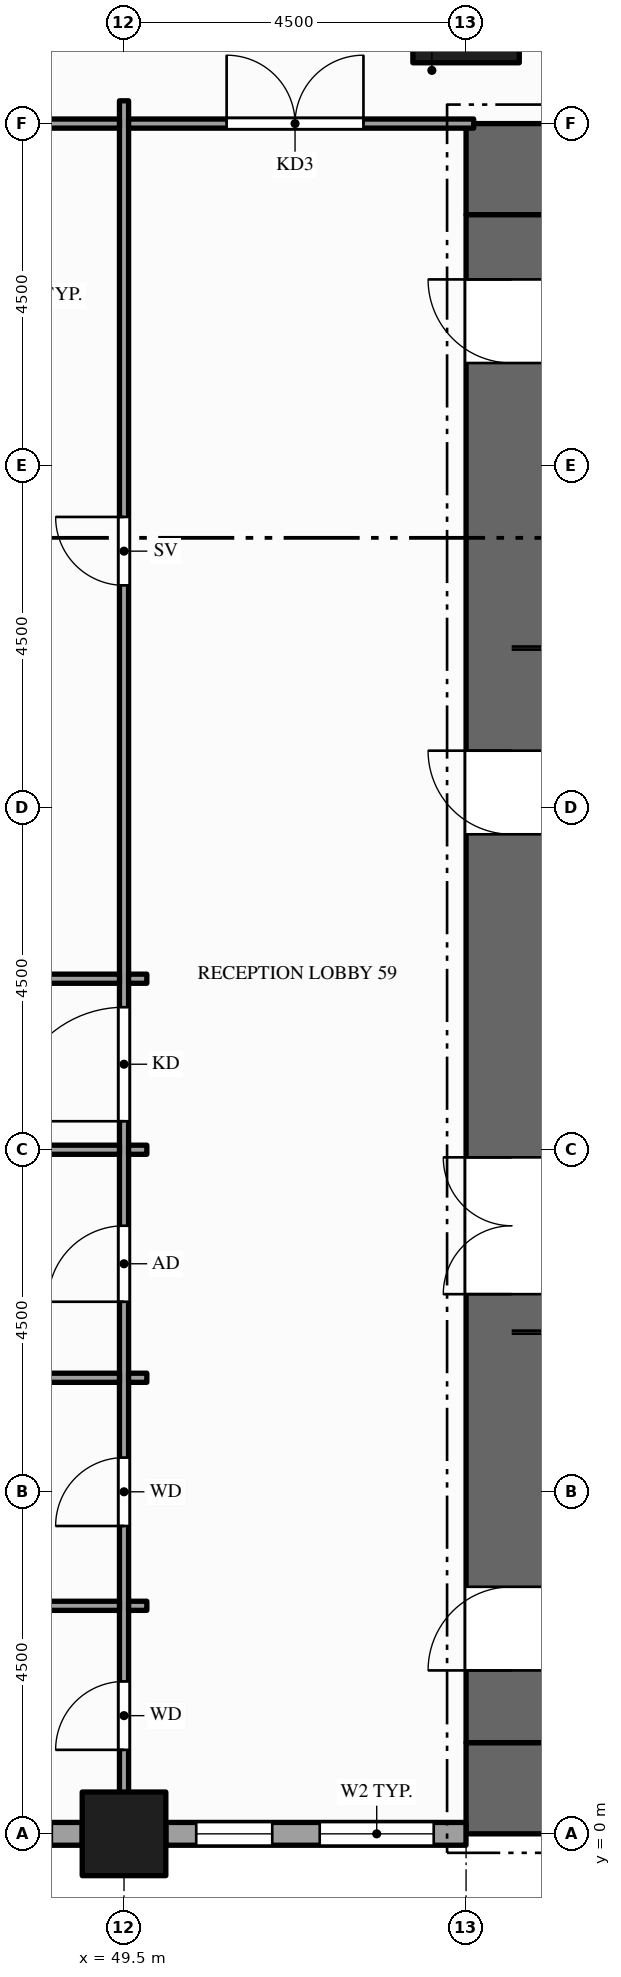
"""IFC4 building model, lengths in metres.
Left out: names, types, materials, properties, quantities, classifications, styles, units other than length and angle.
Written with IfcOpenShell. Run it as: python <this file> out.ifc"""

import sys

from ifc_helpers import new_model, si_unit, direction, frame, frame_2d, origin, origin_2d, place, context, subcontext, project, spatial, rectangle, hollow_rectangle, extrude, element, fill, save


model = new_model("IFC4")
c1 = context("Model", 3, precision=1e-05, world=origin(), true_north=direction((0.0, 1.0)))
c2 = subcontext(c1, "Body", "Model", "MODEL_VIEW")
j1 = project(units=[si_unit("LENGTHUNIT", "METRE"), si_unit("PLANEANGLEUNIT", "RADIAN")], contexts=[c1])
p1 = place(None, origin())
s1 = spatial("IfcSite", under=j1, at=p1, CompositionType="ELEMENT")
p2 = place(p1, origin())
s2 = spatial("IfcBuilding", under=s1, at=p2, CompositionType="ELEMENT")
p3 = place(p2, frame((0.0, 0.0, 8.0)))
s3 = spatial("IfcBuildingStorey", under=s2, at=p3, CompositionType="ELEMENT", Elevation=8.0)
for number, where, z_axis, x_axis in (
    (1, (67.5, 0.6, -0.15), (0.0, 0.0, 1.0), (-1.0, 0.0, 0.0)),
    (2, (54.0, 21.9, -0.15), (0.0, 0.0, 1.0), (1.0, 0.0, 0.0)),
):
    element("IfcWall", number, at=place(p3, frame(where, z_axis=z_axis, x_axis=x_axis)), inside=s3, PredefinedType="SHEAR", context=c2, shape_type="SweptSolid", body=[
        extrude(rectangle(XDim=13.5, YDim=1.2, at=frame_2d((6.75, 0.0))), origin(), (0.0, 0.0, 1.0), 6.0),
    ])
p4 = place(p3, frame((54.6, 1.2, -0.15), z_axis=(0.0, 0.0, 1.0), x_axis=(0.0, 1.0, 0.0)))
e3 = element("IfcWall", 3, at=p4, inside=s3, PredefinedType="SHEAR", context=c2, shape_type="SweptSolid", body=[
    extrude(rectangle(XDim=20.1, YDim=1.2, at=frame_2d((10.05, 0.0))), origin(), (0.0, 0.0, 1.0), 6.0),
])
p5 = place(p4, frame((5.9, 0.0, 0.15)))
e4 = element("IfcOpeningElement", 4, at=p5, cuts=e3, PredefinedType="OPENING", context=c2, shape_type="SweptSolid", body=[
    extrude(rectangle(XDim=1.8, YDim=2.1, at=frame_2d((0.9, 1.05))), frame((0.0, 0.61, 0.0), z_axis=(0.0, -1.0, 0.0), x_axis=(1.0, 0.0, 0.0)), (0.0, 0.0, 1.0), 1.22),
])
p6 = place(p4, frame((11.95, 0.0, 0.15)))
e5 = element("IfcOpeningElement", 5, at=p6, cuts=e3, PredefinedType="OPENING", context=c2, shape_type="SweptSolid", body=[
    extrude(rectangle(XDim=1.1, YDim=2.1, at=frame_2d((0.55, 1.05))), frame((0.0, 0.61, 0.0), z_axis=(0.0, -1.0, 0.0), x_axis=(1.0, 0.0, 0.0)), (0.0, 0.0, 1.0), 1.22),
])
p7 = place(p4, frame((0.95, 0.0, 0.15)))
e6 = element("IfcOpeningElement", 6, at=p7, cuts=e3, PredefinedType="OPENING", context=c2, shape_type="SweptSolid", body=[
    extrude(rectangle(XDim=1.1, YDim=2.1, at=frame_2d((0.55, 1.05))), frame((0.0, 0.61, 0.0), z_axis=(0.0, -1.0, 0.0), x_axis=(1.0, 0.0, 0.0)), (0.0, 0.0, 1.0), 1.22),
])
p8 = place(p4, frame((18.15, 0.0, 0.15)))
e7 = element("IfcOpeningElement", 7, at=p8, cuts=e3, PredefinedType="OPENING", context=c2, shape_type="SweptSolid", body=[
    extrude(rectangle(XDim=1.1, YDim=2.1, at=frame_2d((0.55, 1.05))), frame((0.0, 0.61, 0.0), z_axis=(0.0, -1.0, 0.0), x_axis=(1.0, 0.0, 0.0)), (0.0, 0.0, 1.0), 1.22),
])
p9 = place(p3, frame((49.5, 0.0, -0.25), z_axis=(0.0, 0.0, 1.0), x_axis=(1.0, 0.0, 0.0)))
e8 = element("IfcColumn", 8, at=p9, inside=s3, PredefinedType="COLUMN", context=c2, shape_type="SweptSolid", body=[
    extrude(hollow_rectangle(XDim=1.1, YDim=1.1, WallThickness=0.06, at=origin_2d()), origin(), (0.0, 0.0, 1.0), 6.0),
])
p10 = place(p3, frame((54.0, 24.0, -0.25), z_axis=(0.0, 0.0, 1.0), x_axis=(1.0, 0.0, 0.0)))
e9 = element("IfcColumn", 9, at=p10, inside=s3, PredefinedType="COLUMN", context=c2, shape_type="SweptSolid", body=[
    extrude(hollow_rectangle(XDim=1.4, YDim=1.4, WallThickness=0.08, at=origin_2d()), origin(), (0.0, 0.0, 1.0), 6.0),
])
p11 = place(p3, frame((45.55, 0.0, 0.0), z_axis=(0.0, 0.0, 1.0), x_axis=(1.0, 0.0, 0.0)))
e10 = element("IfcWall", 10, at=p11, inside=s3, PredefinedType="STANDARD", context=c2, shape_type="SweptSolid", body=[
    extrude(rectangle(XDim=3.4, YDim=0.3, at=frame_2d((1.7, 0.0))), origin(), (0.0, 0.0, 1.0), 5.036),
])
p12 = place(p11, frame((0.4, 0.0, 0.9)))
e11 = element("IfcOpeningElement", 11, at=p12, cuts=e10, PredefinedType="OPENING", context=c2, shape_type="SweptSolid", body=[
    extrude(rectangle(XDim=1.0, YDim=3.5, at=frame_2d((0.5, 1.75))), frame((0.0, 0.16, 0.0), z_axis=(0.0, -1.0, 0.0), x_axis=(1.0, 0.0, 0.0)), (0.0, 0.0, 1.0), 0.32),
])
p13 = place(p11, frame((2.0, 0.0, 0.9)))
e12 = element("IfcOpeningElement", 12, at=p13, cuts=e10, PredefinedType="OPENING", context=c2, shape_type="SweptSolid", body=[
    extrude(rectangle(XDim=1.0, YDim=3.5, at=frame_2d((0.5, 1.75))), frame((0.0, 0.16, 0.0), z_axis=(0.0, -1.0, 0.0), x_axis=(1.0, 0.0, 0.0)), (0.0, 0.0, 1.0), 0.32),
])
p14 = place(p3, frame((50.05, 0.0, 0.0), z_axis=(0.0, 0.0, 1.0), x_axis=(1.0, 0.0, 0.0)))
e13 = element("IfcWall", 13, at=p14, inside=s3, PredefinedType="STANDARD", context=c2, shape_type="SweptSolid", body=[
    extrude(rectangle(XDim=3.949, YDim=0.3, at=frame_2d((1.975, 0.0))), origin(), (0.0, 0.0, 1.0), 5.036),
])
p15 = place(p14, frame((0.4, 0.0, 0.9)))
e14 = element("IfcOpeningElement", 14, at=p15, cuts=e13, PredefinedType="OPENING", context=c2, shape_type="SweptSolid", body=[
    extrude(rectangle(XDim=1.0, YDim=3.5, at=frame_2d((0.5, 1.75))), frame((0.0, 0.16, 0.0), z_axis=(0.0, -1.0, 0.0), x_axis=(1.0, 0.0, 0.0)), (0.0, 0.0, 1.0), 0.32),
])
p16 = place(p14, frame((2.024, 0.0, 0.9)))
e15 = element("IfcOpeningElement", 15, at=p16, cuts=e13, PredefinedType="OPENING", context=c2, shape_type="SweptSolid", body=[
    extrude(rectangle(XDim=1.5, YDim=3.5, at=frame_2d((0.75, 1.75))), frame((0.0, 0.16, 0.0), z_axis=(0.0, -1.0, 0.0), x_axis=(1.0, 0.0, 0.0)), (0.0, 0.0, 1.0), 0.32),
])
p17 = place(p3, frame((49.5, 0.15, 0.0), z_axis=(0.0, 0.0, 1.0), x_axis=(0.0, 1.0, 0.0)))
e16 = element("IfcWall", 16, at=p17, inside=s3, PredefinedType="PARTITIONING", context=c2, shape_type="SweptSolid", body=[
    extrude(rectangle(XDim=22.65, YDim=0.12, at=frame_2d((11.325, 0.0))), origin(), (0.0, 0.0, 1.0), 4.759),
])
p18 = place(p17, frame((0.955, 0.0, 0.0)))
e17 = element("IfcOpeningElement", 17, at=p18, cuts=e16, PredefinedType="OPENING", context=c2, shape_type="SweptSolid", body=[
    extrude(rectangle(XDim=0.9, YDim=2.1, at=frame_2d((0.45, 1.05))), frame((0.0, 0.07, 0.0), z_axis=(0.0, -1.0, 0.0), x_axis=(1.0, 0.0, 0.0)), (0.0, 0.0, 1.0), 0.14),
])
p19 = place(p17, frame((3.9, 0.0, 0.0)))
e18 = element("IfcOpeningElement", 18, at=p19, cuts=e16, PredefinedType="OPENING", context=c2, shape_type="SweptSolid", body=[
    extrude(rectangle(XDim=0.9, YDim=2.1, at=frame_2d((0.45, 1.05))), frame((0.0, 0.07, 0.0), z_axis=(0.0, -1.0, 0.0), x_axis=(1.0, 0.0, 0.0)), (0.0, 0.0, 1.0), 0.14),
])
p20 = place(p17, frame((6.85, 0.0, 0.0)))
e19 = element("IfcOpeningElement", 19, at=p20, cuts=e16, PredefinedType="OPENING", context=c2, shape_type="SweptSolid", body=[
    extrude(rectangle(XDim=1.0, YDim=2.1, at=frame_2d((0.5, 1.05))), frame((0.0, 0.07, 0.0), z_axis=(0.0, -1.0, 0.0), x_axis=(1.0, 0.0, 0.0)), (0.0, 0.0, 1.0), 0.14),
])
p21 = place(p17, frame((16.275, 0.0, 0.0)))
e20 = element("IfcOpeningElement", 20, at=p21, cuts=e16, PredefinedType="OPENING", context=c2, shape_type="SweptSolid", body=[
    extrude(rectangle(XDim=0.9, YDim=2.1, at=frame_2d((0.45, 1.05))), frame((0.0, 0.07, 0.0), z_axis=(0.0, -1.0, 0.0), x_axis=(1.0, 0.0, 0.0)), (0.0, 0.0, 1.0), 0.14),
])
p22 = place(p17, frame((9.225, 0.0, 0.0)))
e21 = element("IfcOpeningElement", 21, at=p22, cuts=e16, PredefinedType="OPENING", context=c2, shape_type="SweptSolid", body=[
    extrude(rectangle(XDim=1.5, YDim=2.1, at=frame_2d((0.75, 1.05))), frame((0.0, 0.07, 0.0), z_axis=(0.0, -1.0, 0.0), x_axis=(1.0, 0.0, 0.0)), (0.0, 0.0, 1.0), 0.14),
])
p23 = place(p3, frame((45.06, 3.0, 0.0), z_axis=(0.0, 0.0, 1.0), x_axis=(1.0, 0.0, 0.0)))
e22 = element("IfcWall", 22, at=p23, inside=s3, PredefinedType="PARTITIONING", context=c2, shape_type="SweptSolid", body=[
    extrude(rectangle(XDim=4.38, YDim=0.12, at=frame_2d((2.19, 0.0))), origin(), (0.0, 0.0, 1.0), 4.66),
])
p24 = place(p3, frame((49.56, 3.0, 0.0), z_axis=(0.0, 0.0, 1.0), x_axis=(1.0, 0.0, 0.0)))
e23 = element("IfcWall", 23, at=p24, inside=s3, PredefinedType="PARTITIONING", context=c2, shape_type="SweptSolid", body=[
    extrude(rectangle(XDim=0.24, YDim=0.12, at=frame_2d((0.12, 0.0))), origin(), (0.0, 0.0, 1.0), 4.759),
])
p25 = place(p3, frame((45.06, 6.0, 0.0), z_axis=(0.0, 0.0, 1.0), x_axis=(1.0, 0.0, 0.0)))
e24 = element("IfcWall", 24, at=p25, inside=s3, PredefinedType="PARTITIONING", context=c2, shape_type="SweptSolid", body=[
    extrude(rectangle(XDim=4.38, YDim=0.12, at=frame_2d((2.19, 0.0))), origin(), (0.0, 0.0, 1.0), 4.66),
])
p26 = place(p3, frame((49.56, 6.0, 0.0), z_axis=(0.0, 0.0, 1.0), x_axis=(1.0, 0.0, 0.0)))
e25 = element("IfcWall", 25, at=p26, inside=s3, PredefinedType="PARTITIONING", context=c2, shape_type="SweptSolid", body=[
    extrude(rectangle(XDim=0.24, YDim=0.12, at=frame_2d((0.12, 0.0))), origin(), (0.0, 0.0, 1.0), 4.759),
])
p27 = place(p3, frame((45.06, 9.0, 0.0), z_axis=(0.0, 0.0, 1.0), x_axis=(1.0, 0.0, 0.0)))
e26 = element("IfcWall", 26, at=p27, inside=s3, PredefinedType="PARTITIONING", context=c2, shape_type="SweptSolid", body=[
    extrude(rectangle(XDim=4.38, YDim=0.12, at=frame_2d((2.19, 0.0))), origin(), (0.0, 0.0, 1.0), 4.66),
])
p28 = place(p3, frame((49.56, 9.0, 0.0), z_axis=(0.0, 0.0, 1.0), x_axis=(1.0, 0.0, 0.0)))
e27 = element("IfcWall", 27, at=p28, inside=s3, PredefinedType="PARTITIONING", context=c2, shape_type="SweptSolid", body=[
    extrude(rectangle(XDim=0.24, YDim=0.12, at=frame_2d((0.12, 0.0))), origin(), (0.0, 0.0, 1.0), 4.759),
])
p29 = place(p3, frame((45.06, 11.25, 0.0), z_axis=(0.0, 0.0, 1.0), x_axis=(1.0, 0.0, 0.0)))
e28 = element("IfcWall", 28, at=p29, inside=s3, PredefinedType="PARTITIONING", context=c2, shape_type="SweptSolid", body=[
    extrude(rectangle(XDim=4.38, YDim=0.12, at=frame_2d((2.19, 0.0))), origin(), (0.0, 0.0, 1.0), 4.66),
])
p30 = place(p3, frame((49.56, 11.25, 0.0), z_axis=(0.0, 0.0, 1.0), x_axis=(1.0, 0.0, 0.0)))
e29 = element("IfcWall", 29, at=p30, inside=s3, PredefinedType="PARTITIONING", context=c2, shape_type="SweptSolid", body=[
    extrude(rectangle(XDim=0.24, YDim=0.12, at=frame_2d((0.12, 0.0))), origin(), (0.0, 0.0, 1.0), 4.759),
])
p31 = place(p3, frame((45.06, 22.5, 0.0), z_axis=(0.0, 0.0, 1.0), x_axis=(1.0, 0.0, 0.0)))
e30 = element("IfcWall", 30, at=p31, inside=s3, PredefinedType="PARTITIONING", context=c2, shape_type="SweptSolid", body=[
    extrude(rectangle(XDim=4.38, YDim=0.12, at=frame_2d((2.19, 0.0))), origin(), (0.0, 0.0, 1.0), 4.66),
])
p32 = place(p3, frame((49.56, 22.5, 0.0), z_axis=(0.0, 0.0, 1.0), x_axis=(1.0, 0.0, 0.0)))
e31 = element("IfcWall", 31, at=p32, inside=s3, PredefinedType="PARTITIONING", context=c2, shape_type="SweptSolid", body=[
    extrude(rectangle(XDim=4.54, YDim=0.12, at=frame_2d((2.27, 0.0))), origin(), (0.0, 0.0, 1.0), 4.66),
])
p33 = place(p32, frame((1.29, 0.0, 0.0)))
e32 = element("IfcOpeningElement", 32, at=p33, cuts=e31, PredefinedType="OPENING", context=c2, shape_type="SweptSolid", body=[
    extrude(rectangle(XDim=1.8, YDim=2.1, at=frame_2d((0.9, 1.05))), frame((0.0, 0.07, 0.0), z_axis=(0.0, -1.0, 0.0), x_axis=(1.0, 0.0, 0.0)), (0.0, 0.0, 1.0), 0.14),
])
p34 = place(p15, origin())
e33 = element("IfcWindow", 33, at=p34, inside=s3, PartitioningType="SINGLE_PANEL", PredefinedType="WINDOW", context=c2, shape_type="SweptSolid", body=[
    extrude(rectangle(XDim=1.0, YDim=3.5, at=frame_2d((0.5, 1.75))), frame((0.0, 0.03, 0.0), z_axis=(0.0, -1.0, 0.0), x_axis=(1.0, 0.0, 0.0)), (0.0, 0.0, 1.0), 0.06),
])
fill(e14, e33)
p35 = place(p16, origin())
e34 = element("IfcWindow", 34, at=p35, inside=s3, PartitioningType="SINGLE_PANEL", PredefinedType="WINDOW", context=c2, shape_type="SweptSolid", body=[
    extrude(rectangle(XDim=1.5, YDim=3.5, at=frame_2d((0.75, 1.75))), frame((0.0, 0.03, 0.0), z_axis=(0.0, -1.0, 0.0), x_axis=(1.0, 0.0, 0.0)), (0.0, 0.0, 1.0), 0.06),
])
fill(e15, e34)
p36 = place(p5, origin())
e35 = element("IfcDoor", 35, at=p36, inside=s3, OperationType="DOUBLE_DOOR_SINGLE_SWING", PredefinedType="DOOR", context=c2, shape_type="SweptSolid", body=[
    extrude(rectangle(XDim=1.8, YDim=2.1, at=frame_2d((0.9, 1.05))), frame((0.0, 0.025, 0.0), z_axis=(0.0, -1.0, 0.0), x_axis=(1.0, 0.0, 0.0)), (0.0, 0.0, 1.0), 0.05),
])
fill(e4, e35)
p37 = place(p6, origin())
e36 = element("IfcDoor", 36, at=p37, inside=s3, OperationType="SINGLE_SWING_RIGHT", PredefinedType="DOOR", context=c2, shape_type="SweptSolid", body=[
    extrude(rectangle(XDim=1.1, YDim=2.1, at=frame_2d((0.55, 1.05))), frame((0.0, 0.025, 0.0), z_axis=(0.0, -1.0, 0.0), x_axis=(1.0, 0.0, 0.0)), (0.0, 0.0, 1.0), 0.05),
])
fill(e5, e36)
p38 = place(p7, origin())
e37 = element("IfcDoor", 37, at=p38, inside=s3, OperationType="SINGLE_SWING_LEFT", PredefinedType="DOOR", context=c2, shape_type="SweptSolid", body=[
    extrude(rectangle(XDim=1.1, YDim=2.1, at=frame_2d((0.55, 1.05))), frame((0.0, 0.025, 0.0), z_axis=(0.0, -1.0, 0.0), x_axis=(1.0, 0.0, 0.0)), (0.0, 0.0, 1.0), 0.05),
])
fill(e6, e37)
p39 = place(p8, origin())
e38 = element("IfcDoor", 38, at=p39, inside=s3, OperationType="SINGLE_SWING_RIGHT", PredefinedType="DOOR", context=c2, shape_type="SweptSolid", body=[
    extrude(rectangle(XDim=1.1, YDim=2.1, at=frame_2d((0.55, 1.05))), frame((0.0, 0.025, 0.0), z_axis=(0.0, -1.0, 0.0), x_axis=(1.0, 0.0, 0.0)), (0.0, 0.0, 1.0), 0.05),
])
fill(e7, e38)
p40 = place(p18, origin())
e39 = element("IfcDoor", 39, at=p40, inside=s3, OperationType="SINGLE_SWING_LEFT", PredefinedType="DOOR", context=c2, shape_type="SweptSolid", body=[
    extrude(rectangle(XDim=0.9, YDim=2.1, at=frame_2d((0.45, 1.05))), frame((0.0, 0.025, 0.0), z_axis=(0.0, -1.0, 0.0), x_axis=(1.0, 0.0, 0.0)), (0.0, 0.0, 1.0), 0.05),
])
fill(e17, e39)
p41 = place(p19, origin())
e40 = element("IfcDoor", 40, at=p41, inside=s3, OperationType="SINGLE_SWING_LEFT", PredefinedType="DOOR", context=c2, shape_type="SweptSolid", body=[
    extrude(rectangle(XDim=0.9, YDim=2.1, at=frame_2d((0.45, 1.05))), frame((0.0, 0.025, 0.0), z_axis=(0.0, -1.0, 0.0), x_axis=(1.0, 0.0, 0.0)), (0.0, 0.0, 1.0), 0.05),
])
fill(e18, e40)
p42 = place(p20, origin())
e41 = element("IfcDoor", 41, at=p42, inside=s3, OperationType="SINGLE_SWING_LEFT", PredefinedType="DOOR", context=c2, shape_type="SweptSolid", body=[
    extrude(rectangle(XDim=1.0, YDim=2.1, at=frame_2d((0.5, 1.05))), frame((0.0, 0.025, 0.0), z_axis=(0.0, -1.0, 0.0), x_axis=(1.0, 0.0, 0.0)), (0.0, 0.0, 1.0), 0.05),
])
fill(e19, e41)
p43 = place(p21, origin())
e42 = element("IfcDoor", 42, at=p43, inside=s3, OperationType="SINGLE_SWING_RIGHT", PredefinedType="DOOR", context=c2, shape_type="SweptSolid", body=[
    extrude(rectangle(XDim=0.9, YDim=2.1, at=frame_2d((0.45, 1.05))), frame((0.0, 0.025, 0.0), z_axis=(0.0, -1.0, 0.0), x_axis=(1.0, 0.0, 0.0)), (0.0, 0.0, 1.0), 0.05),
])
fill(e20, e42)
p44 = place(p22, origin())
e43 = element("IfcDoor", 43, at=p44, inside=s3, OperationType="SINGLE_SWING_LEFT", PredefinedType="DOOR", context=c2, shape_type="SweptSolid", body=[
    extrude(rectangle(XDim=1.5, YDim=2.1, at=frame_2d((0.75, 1.05))), frame((0.0, 0.025, 0.0), z_axis=(0.0, -1.0, 0.0), x_axis=(1.0, 0.0, 0.0)), (0.0, 0.0, 1.0), 0.05),
])
fill(e21, e43)
p45 = place(p33, origin())
e44 = element("IfcDoor", 44, at=p45, inside=s3, OperationType="DOUBLE_DOOR_SINGLE_SWING", PredefinedType="DOOR", context=c2, shape_type="SweptSolid", body=[
    extrude(rectangle(XDim=1.8, YDim=2.1, at=frame_2d((0.9, 1.05))), frame((0.0, 0.025, 0.0), z_axis=(0.0, -1.0, 0.0), x_axis=(1.0, 0.0, 0.0)), (0.0, 0.0, 1.0), 0.05),
])
fill(e32, e44)
save(model, sys.argv[1])
